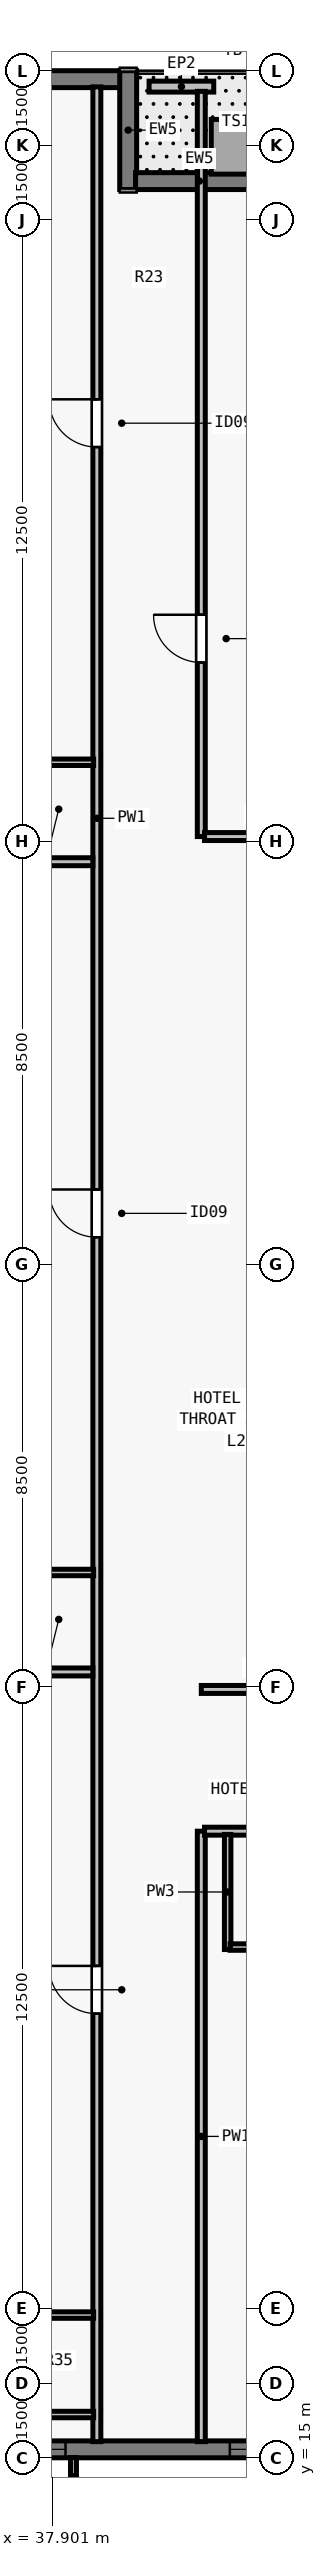
"""IFC4 building model, lengths in metres.
Left out: names, types, materials, properties, quantities, classifications, styles, units other than length and angle.
Written with IfcOpenShell. Run it as: python <this file> out.ifc"""

import sys

from ifc_helpers import new_model, si_unit, direction, frame, frame_2d, origin, place, context, subcontext, project, spatial, rectangle, extrude, element, fill, save


model = new_model("IFC4")
c1 = context("Model", 3, precision=1e-05, world=origin(), true_north=direction((0.0, 1.0)))
c2 = subcontext(c1, "Body", "Model", "MODEL_VIEW")
j1 = project(units=[si_unit("LENGTHUNIT", "METRE"), si_unit("PLANEANGLEUNIT", "RADIAN")], contexts=[c1])
p1 = place(None, origin())
s1 = spatial("IfcSite", under=j1, at=p1, CompositionType="ELEMENT")
p2 = place(p1, origin())
s2 = spatial("IfcBuilding", under=s1, at=p2, CompositionType="ELEMENT")
p3 = place(p2, frame((0.0, 0.0, 106.0)))
s3 = spatial("IfcBuildingStorey", under=s2, at=p3, CompositionType="ELEMENT", Elevation=106.0)
p4 = place(p3, frame((72.0, 15.17, 0.0), z_axis=(0.0, 0.0, 1.0), x_axis=(-1.0, 0.0, 0.0)))
e1 = element("IfcWall", 1, at=p4, inside=s3, PredefinedType="SOLIDWALL", context=c2, shape_type="SweptSolid", body=[
    extrude(rectangle(XDim=39.682, YDim=0.34, at=frame_2d((19.841, 0.0))), origin(), (0.0, 0.0, 1.0), 3.28),
])
p5 = place(p4, frame((4.952, 0.0, 0.8)))
e2 = element("IfcOpeningElement", 2, at=p5, cuts=e1, PredefinedType="OPENING", context=c2, shape_type="SweptSolid", body=[
    extrude(rectangle(XDim=1.35, YDim=1.66, at=frame_2d((0.675, 0.83))), frame((0.0, 0.18, 0.0), z_axis=(0.0, -1.0, 0.0), x_axis=(1.0, 0.0, 0.0)), (0.0, 0.0, 1.0), 0.36),
])
p6 = place(p4, frame((9.555, 0.0, 0.8)))
e3 = element("IfcOpeningElement", 3, at=p6, cuts=e1, PredefinedType="OPENING", context=c2, shape_type="SweptSolid", body=[
    extrude(rectangle(XDim=1.75, YDim=1.66, at=frame_2d((0.875, 0.83))), frame((0.0, 0.18, 0.0), z_axis=(0.0, -1.0, 0.0), x_axis=(1.0, 0.0, 0.0)), (0.0, 0.0, 1.0), 0.36),
])
p7 = place(p4, frame((12.059, 0.0, 0.8)))
e4 = element("IfcOpeningElement", 4, at=p7, cuts=e1, PredefinedType="OPENING", context=c2, shape_type="SweptSolid", body=[
    extrude(rectangle(XDim=1.35, YDim=1.66, at=frame_2d((0.675, 0.83))), frame((0.0, 0.18, 0.0), z_axis=(0.0, -1.0, 0.0), x_axis=(1.0, 0.0, 0.0)), (0.0, 0.0, 1.0), 0.36),
])
p8 = place(p4, frame((16.262, 0.0, 0.8)))
e5 = element("IfcOpeningElement", 5, at=p8, cuts=e1, PredefinedType="OPENING", context=c2, shape_type="SweptSolid", body=[
    extrude(rectangle(XDim=1.75, YDim=1.66, at=frame_2d((0.875, 0.83))), frame((0.0, 0.18, 0.0), z_axis=(0.0, -1.0, 0.0), x_axis=(1.0, 0.0, 0.0)), (0.0, 0.0, 1.0), 0.36),
])
p9 = place(p4, frame((18.716, 0.0, 0.8)))
e6 = element("IfcOpeningElement", 6, at=p9, cuts=e1, PredefinedType="OPENING", context=c2, shape_type="SweptSolid", body=[
    extrude(rectangle(XDim=1.35, YDim=1.66, at=frame_2d((0.675, 0.83))), frame((0.0, 0.18, 0.0), z_axis=(0.0, -1.0, 0.0), x_axis=(1.0, 0.0, 0.0)), (0.0, 0.0, 1.0), 0.36),
])
p10 = place(p4, frame((22.07, 0.0, 0.8)))
e7 = element("IfcOpeningElement", 7, at=p10, cuts=e1, PredefinedType="OPENING", context=c2, shape_type="SweptSolid", body=[
    extrude(rectangle(XDim=1.75, YDim=1.66, at=frame_2d((0.875, 0.83))), frame((0.0, 0.18, 0.0), z_axis=(0.0, -1.0, 0.0), x_axis=(1.0, 0.0, 0.0)), (0.0, 0.0, 1.0), 0.36),
])
p11 = place(p4, frame((26.273, 0.0, 0.8)))
e8 = element("IfcOpeningElement", 8, at=p11, cuts=e1, PredefinedType="OPENING", context=c2, shape_type="SweptSolid", body=[
    extrude(rectangle(XDim=1.35, YDim=1.66, at=frame_2d((0.675, 0.83))), frame((0.0, 0.18, 0.0), z_axis=(0.0, -1.0, 0.0), x_axis=(1.0, 0.0, 0.0)), (0.0, 0.0, 1.0), 0.36),
])
p12 = place(p4, frame((28.777, 0.0, 0.8)))
e9 = element("IfcOpeningElement", 9, at=p12, cuts=e1, PredefinedType="OPENING", context=c2, shape_type="SweptSolid", body=[
    extrude(rectangle(XDim=1.75, YDim=1.66, at=frame_2d((0.875, 0.83))), frame((0.0, 0.18, 0.0), z_axis=(0.0, -1.0, 0.0), x_axis=(1.0, 0.0, 0.0)), (0.0, 0.0, 1.0), 0.36),
])
p13 = place(p4, frame((33.83, 0.0, 0.8)))
e10 = element("IfcOpeningElement", 10, at=p13, cuts=e1, PredefinedType="OPENING", context=c2, shape_type="SweptSolid", body=[
    extrude(rectangle(XDim=1.35, YDim=1.66, at=frame_2d((0.675, 0.83))), frame((0.0, 0.18, 0.0), z_axis=(0.0, -1.0, 0.0), x_axis=(1.0, 0.0, 0.0)), (0.0, 0.0, 1.0), 0.36),
])
p14 = place(p3, frame((32.0, 62.83, 0.0), z_axis=(0.0, 0.0, 1.0), x_axis=(1.0, 0.0, 0.0)))
e11 = element("IfcWall", 11, at=p14, inside=s3, PredefinedType="SOLIDWALL", context=c2, shape_type="SweptSolid", body=[
    extrude(rectangle(XDim=7.282, YDim=0.34, at=frame_2d((3.641, 0.0))), origin(), (0.0, 0.0, 1.0), 3.28),
])
p15 = place(p3, frame((39.43, 63.0, 0.0), z_axis=(0.0, 0.0, 1.0), x_axis=(0.0, -1.0, 0.0)))
e12 = element("IfcWall", 12, at=p15, inside=s3, PredefinedType="SOLIDWALL", context=c2, shape_type="SweptSolid", body=[
    extrude(rectangle(XDim=2.39, YDim=0.34, at=frame_2d((1.195, 0.0))), origin(), (0.0, 0.0, 1.0), 3.28),
])
p16 = place(p3, frame((39.578, 60.78, 0.0), z_axis=(0.0, 0.0, 1.0), x_axis=(1.0, 0.0, 0.0)))
e13 = element("IfcWall", 13, at=p16, inside=s3, PredefinedType="SOLIDWALL", context=c2, shape_type="SweptSolid", body=[
    extrude(rectangle(XDim=5.762, YDim=0.34, at=frame_2d((2.881, 0.0))), origin(), (0.0, 0.0, 1.0), 3.28),
])
p17 = place(p16, frame((2.717, 0.0, 0.0)))
e14 = element("IfcOpeningElement", 14, at=p17, cuts=e13, PredefinedType="OPENING", context=c2, shape_type="SweptSolid", body=[
    extrude(rectangle(XDim=1.0, YDim=2.15, at=frame_2d((0.5, 1.075))), frame((0.0, 0.18, 0.0), z_axis=(0.0, -1.0, 0.0), x_axis=(1.0, 0.0, 0.0)), (0.0, 0.0, 1.0), 0.36),
])
p18 = place(p3, frame((39.85, 62.68, 0.0), z_axis=(0.0, 0.0, 1.0), x_axis=(1.0, 0.0, 0.0)))
e15 = element("IfcWall", 15, at=p18, inside=s3, PredefinedType="PARAPET", context=c2, shape_type="SweptSolid", body=[
    extrude(rectangle(XDim=1.3, YDim=0.22, at=frame_2d((0.65, 0.0))), origin(), (0.0, 0.0, 1.0), 0.55),
])
p19 = place(p3, frame((38.8, 15.325, 0.0), z_axis=(0.0, 0.0, 1.0), x_axis=(0.0, 1.0, 0.0)))
e16 = element("IfcWall", 16, at=p19, inside=s3, PredefinedType="PARTITIONING", context=c2, shape_type="SweptSolid", body=[
    extrude(rectangle(XDim=47.35, YDim=0.16, at=frame_2d((23.675, 0.0))), origin(), (0.0, 0.0, 1.0), 2.555),
])
p20 = place(p19, frame((8.606, 0.0, 0.0)))
e17 = element("IfcOpeningElement", 17, at=p20, cuts=e16, PredefinedType="OPENING", context=c2, shape_type="SweptSolid", body=[
    extrude(rectangle(XDim=0.96, YDim=2.15, at=frame_2d((0.48, 1.075))), frame((0.0, 0.09, 0.0), z_axis=(0.0, -1.0, 0.0), x_axis=(1.0, 0.0, 0.0)), (0.0, 0.0, 1.0), 0.18),
])
p21 = place(p19, frame((24.218, 0.0, 0.0)))
e18 = element("IfcOpeningElement", 18, at=p21, cuts=e16, PredefinedType="OPENING", context=c2, shape_type="SweptSolid", body=[
    extrude(rectangle(XDim=0.96, YDim=2.15, at=frame_2d((0.48, 1.075))), frame((0.0, 0.09, 0.0), z_axis=(0.0, -1.0, 0.0), x_axis=(1.0, 0.0, 0.0)), (0.0, 0.0, 1.0), 0.18),
])
p22 = place(p19, frame((40.107, 0.0, 0.0)))
e19 = element("IfcOpeningElement", 19, at=p22, cuts=e16, PredefinedType="OPENING", context=c2, shape_type="SweptSolid", body=[
    extrude(rectangle(XDim=0.96, YDim=2.15, at=frame_2d((0.48, 1.075))), frame((0.0, 0.09, 0.0), z_axis=(0.0, -1.0, 0.0), x_axis=(1.0, 0.0, 0.0)), (0.0, 0.0, 1.0), 0.18),
])
p23 = place(p3, frame((40.9, 15.325, 0.0), z_axis=(0.0, 0.0, 1.0), x_axis=(0.0, 1.0, 0.0)))
e20 = element("IfcWall", 20, at=p23, inside=s3, PredefinedType="PARTITIONING", context=c2, shape_type="SweptSolid", body=[
    extrude(rectangle(XDim=12.275, YDim=0.16, at=frame_2d((6.138, 0.0))), origin(), (0.0, 0.0, 1.0), 2.555),
])
p24 = place(p3, frame((40.9, 47.6, 0.0), z_axis=(0.0, 0.0, 1.0), x_axis=(0.0, 1.0, 0.0)))
e21 = element("IfcWall", 21, at=p24, inside=s3, PredefinedType="PARTITIONING", context=c2, shape_type="SweptSolid", body=[
    extrude(rectangle(XDim=14.985, YDim=0.16, at=frame_2d((7.492, 0.0))), origin(), (0.0, 0.0, 1.0), 2.555),
])
p25 = place(p24, frame((3.5, 0.0, 0.0)))
e22 = element("IfcOpeningElement", 22, at=p25, cuts=e21, PredefinedType="OPENING", context=c2, shape_type="SweptSolid", body=[
    extrude(rectangle(XDim=0.96, YDim=2.12, at=frame_2d((0.48, 1.06))), frame((0.0, 0.09, 0.0), z_axis=(0.0, -1.0, 0.0), x_axis=(1.0, 0.0, 0.0)), (0.0, 0.0, 1.0), 0.18),
])
p26 = place(p3, frame((40.9, 30.45, 0.0), z_axis=(0.0, 0.0, 1.0), x_axis=(1.0, 0.0, 0.0)))
e23 = element("IfcWall", 23, at=p26, inside=s3, PredefinedType="PARTITIONING", context=c2, shape_type="SweptSolid", body=[
    extrude(rectangle(XDim=2.335, YDim=0.16, at=frame_2d((1.167, 0.0))), origin(), (0.0, 0.0, 1.0), 3.28),
])
p27 = place(p3, frame((40.965, 47.6, 0.0), z_axis=(0.0, 0.0, 1.0), x_axis=(1.0, 0.0, 0.0)))
e24 = element("IfcWall", 24, at=p27, inside=s3, PredefinedType="PARTITIONING", context=c2, shape_type="SweptSolid", body=[
    extrude(rectangle(XDim=2.27, YDim=0.16, at=frame_2d((1.135, 0.0))), origin(), (0.0, 0.0, 1.0), 3.28),
])
p28 = place(p3, frame((40.965, 27.6, 0.0), z_axis=(0.0, 0.0, 1.0), x_axis=(1.0, 0.0, 0.0)))
e25 = element("IfcWall", 25, at=p28, inside=s3, PredefinedType="PARTITIONING", context=c2, shape_type="SweptSolid", body=[
    extrude(rectangle(XDim=22.07, YDim=0.16, at=frame_2d((11.035, 0.0))), origin(), (0.0, 0.0, 1.0), 3.28),
])
p29 = place(p28, frame((6.085, 0.0, 0.0)))
e26 = element("IfcOpeningElement", 26, at=p29, cuts=e25, PredefinedType="OPENING", context=c2, shape_type="SweptSolid", body=[
    extrude(rectangle(XDim=0.96, YDim=2.15, at=frame_2d((0.48, 1.075))), frame((0.0, 0.09, 0.0), z_axis=(0.0, -1.0, 0.0), x_axis=(1.0, 0.0, 0.0)), (0.0, 0.0, 1.0), 0.18),
])
p30 = place(p28, frame((16.88, 0.0, 0.0)))
e27 = element("IfcOpeningElement", 27, at=p30, cuts=e25, PredefinedType="OPENING", context=c2, shape_type="SweptSolid", body=[
    extrude(rectangle(XDim=0.96, YDim=2.15, at=frame_2d((0.48, 1.075))), frame((0.0, 0.09, 0.0), z_axis=(0.0, -1.0, 0.0), x_axis=(1.0, 0.0, 0.0)), (0.0, 0.0, 1.0), 0.18),
])
p31 = place(p3, frame((41.43, 25.22, 0.0), z_axis=(0.0, 0.0, 1.0), x_axis=(0.0, 1.0, 0.0)))
e28 = element("IfcWall", 28, at=p31, inside=s3, PredefinedType="PLUMBINGWALL", context=c2, shape_type="SweptSolid", body=[
    extrude(rectangle(XDim=2.315, YDim=0.13, at=frame_2d((1.157, 0.0))), origin(), (0.0, 0.0, 1.0), 3.28),
])
p32 = place(p3, frame((41.48, 25.27, 0.0), z_axis=(0.0, 0.0, 1.0), x_axis=(1.0, 0.0, 0.0)))
e29 = element("IfcWall", 29, at=p32, inside=s3, PredefinedType="PLUMBINGWALL", context=c2, shape_type="SweptSolid", body=[
    extrude(rectangle(XDim=1.9, YDim=0.13, at=frame_2d((0.95, 0.0))), origin(), (0.0, 0.0, 1.0), 3.28),
])
p33 = place(p32, frame((0.54, 0.0, 0.0)))
e30 = element("IfcOpeningElement", 30, at=p33, cuts=e29, PredefinedType="OPENING", context=c2, shape_type="SweptSolid", body=[
    extrude(rectangle(XDim=0.82, YDim=2.1, at=frame_2d((0.41, 1.05))), frame((0.0, 0.075, 0.0), z_axis=(0.0, -1.0, 0.0), x_axis=(1.0, 0.0, 0.0)), (0.0, 0.0, 1.0), 0.15),
])
for number, where, z_axis, x_axis in (
    (31, (36.42, 15.87, 0.0), (0.0, 0.0, 1.0), (1.0, 0.0, 0.0)),
    (32, (36.42, 17.87, 0.0), (0.0, 0.0, 1.0), (1.0, 0.0, 0.0)),
):
    element("IfcWall", number, at=place(p3, frame(where, z_axis=z_axis, x_axis=x_axis)), inside=s3, PredefinedType="PLUMBINGWALL", context=c2, shape_type="SweptSolid", body=[
        extrude(rectangle(XDim=2.315, YDim=0.13, at=frame_2d((1.158, 0.0))), origin(), (0.0, 0.0, 1.0), 3.28),
    ])
p34 = place(p3, frame((28.325, 30.802, 0.0), z_axis=(0.0, 0.0, 1.0), x_axis=(1.0, 0.0, 0.0)))
e33 = element("IfcWall", 33, at=p34, inside=s3, PredefinedType="PARTITIONING", context=c2, shape_type="SweptSolid", body=[
    extrude(rectangle(XDim=10.395, YDim=0.16, at=frame_2d((5.198, 0.0))), origin(), (0.0, 0.0, 1.0), 3.28),
])
p35 = place(p3, frame((36.42, 32.802, 0.0), z_axis=(0.0, 0.0, 1.0), x_axis=(1.0, 0.0, 0.0)))
e34 = element("IfcWall", 34, at=p35, inside=s3, PredefinedType="PLUMBINGWALL", context=c2, shape_type="SweptSolid", body=[
    extrude(rectangle(XDim=2.315, YDim=0.13, at=frame_2d((1.158, 0.0))), origin(), (0.0, 0.0, 1.0), 3.28),
])
p36 = place(p3, frame((28.325, 47.094, 0.0), z_axis=(0.0, 0.0, 1.0), x_axis=(1.0, 0.0, 0.0)))
e35 = element("IfcWall", 35, at=p36, inside=s3, PredefinedType="PARTITIONING", context=c2, shape_type="SweptSolid", body=[
    extrude(rectangle(XDim=10.395, YDim=0.16, at=frame_2d((5.198, 0.0))), origin(), (0.0, 0.0, 1.0), 3.28),
])
p37 = place(p3, frame((36.42, 49.094, 0.0), z_axis=(0.0, 0.0, 1.0), x_axis=(1.0, 0.0, 0.0)))
e36 = element("IfcWall", 36, at=p37, inside=s3, PredefinedType="PLUMBINGWALL", context=c2, shape_type="SweptSolid", body=[
    extrude(rectangle(XDim=2.315, YDim=0.13, at=frame_2d((1.158, 0.0))), origin(), (0.0, 0.0, 1.0), 3.28),
])
p38 = place(p12, origin())
e37 = element("IfcWindow", 37, at=p38, inside=s3, PartitioningType="SINGLE_PANEL", PredefinedType="WINDOW", context=c2, shape_type="SweptSolid", body=[
    extrude(rectangle(XDim=1.75, YDim=1.66, at=frame_2d((0.875, 0.83))), frame((0.0, -0.05, 0.0), z_axis=(0.0, -1.0, 0.0), x_axis=(1.0, 0.0, 0.0)), (0.0, 0.0, 1.0), 0.06),
])
fill(e9, e37)
p39 = place(p13, origin())
e38 = element("IfcWindow", 38, at=p39, inside=s3, PartitioningType="SINGLE_PANEL", PredefinedType="WINDOW", context=c2, shape_type="SweptSolid", body=[
    extrude(rectangle(XDim=1.35, YDim=1.66, at=frame_2d((0.675, 0.83))), frame((0.0, -0.05, 0.0), z_axis=(0.0, -1.0, 0.0), x_axis=(1.0, 0.0, 0.0)), (0.0, 0.0, 1.0), 0.06),
])
fill(e10, e38)
p40 = place(p25, origin())
e39 = element("IfcDoor", 39, at=p40, inside=s3, OperationType="SINGLE_SWING_RIGHT", PredefinedType="DOOR", context=c2, shape_type="SweptSolid", body=[
    extrude(rectangle(XDim=0.96, YDim=2.12, at=frame_2d((0.48, 1.06))), frame((0.0, 0.025, 0.0), z_axis=(0.0, -1.0, 0.0), x_axis=(1.0, 0.0, 0.0)), (0.0, 0.0, 1.0), 0.05),
])
fill(e22, e39)
p41 = place(p20, origin())
e40 = element("IfcDoor", 40, at=p41, inside=s3, OperationType="SINGLE_SWING_RIGHT", PredefinedType="DOOR", context=c2, shape_type="SweptSolid", body=[
    extrude(rectangle(XDim=0.96, YDim=2.15, at=frame_2d((0.48, 1.075))), frame((0.0, 0.025, 0.0), z_axis=(0.0, -1.0, 0.0), x_axis=(1.0, 0.0, 0.0)), (0.0, 0.0, 1.0), 0.05),
])
fill(e17, e40)
p42 = place(p21, origin())
e41 = element("IfcDoor", 41, at=p42, inside=s3, OperationType="SINGLE_SWING_RIGHT", PredefinedType="DOOR", context=c2, shape_type="SweptSolid", body=[
    extrude(rectangle(XDim=0.96, YDim=2.15, at=frame_2d((0.48, 1.075))), frame((0.0, 0.025, 0.0), z_axis=(0.0, -1.0, 0.0), x_axis=(1.0, 0.0, 0.0)), (0.0, 0.0, 1.0), 0.05),
])
fill(e18, e41)
p43 = place(p22, origin())
e42 = element("IfcDoor", 42, at=p43, inside=s3, OperationType="SINGLE_SWING_RIGHT", PredefinedType="DOOR", context=c2, shape_type="SweptSolid", body=[
    extrude(rectangle(XDim=0.96, YDim=2.15, at=frame_2d((0.48, 1.075))), frame((0.0, 0.025, 0.0), z_axis=(0.0, -1.0, 0.0), x_axis=(1.0, 0.0, 0.0)), (0.0, 0.0, 1.0), 0.05),
])
fill(e19, e42)
save(model, sys.argv[1])
